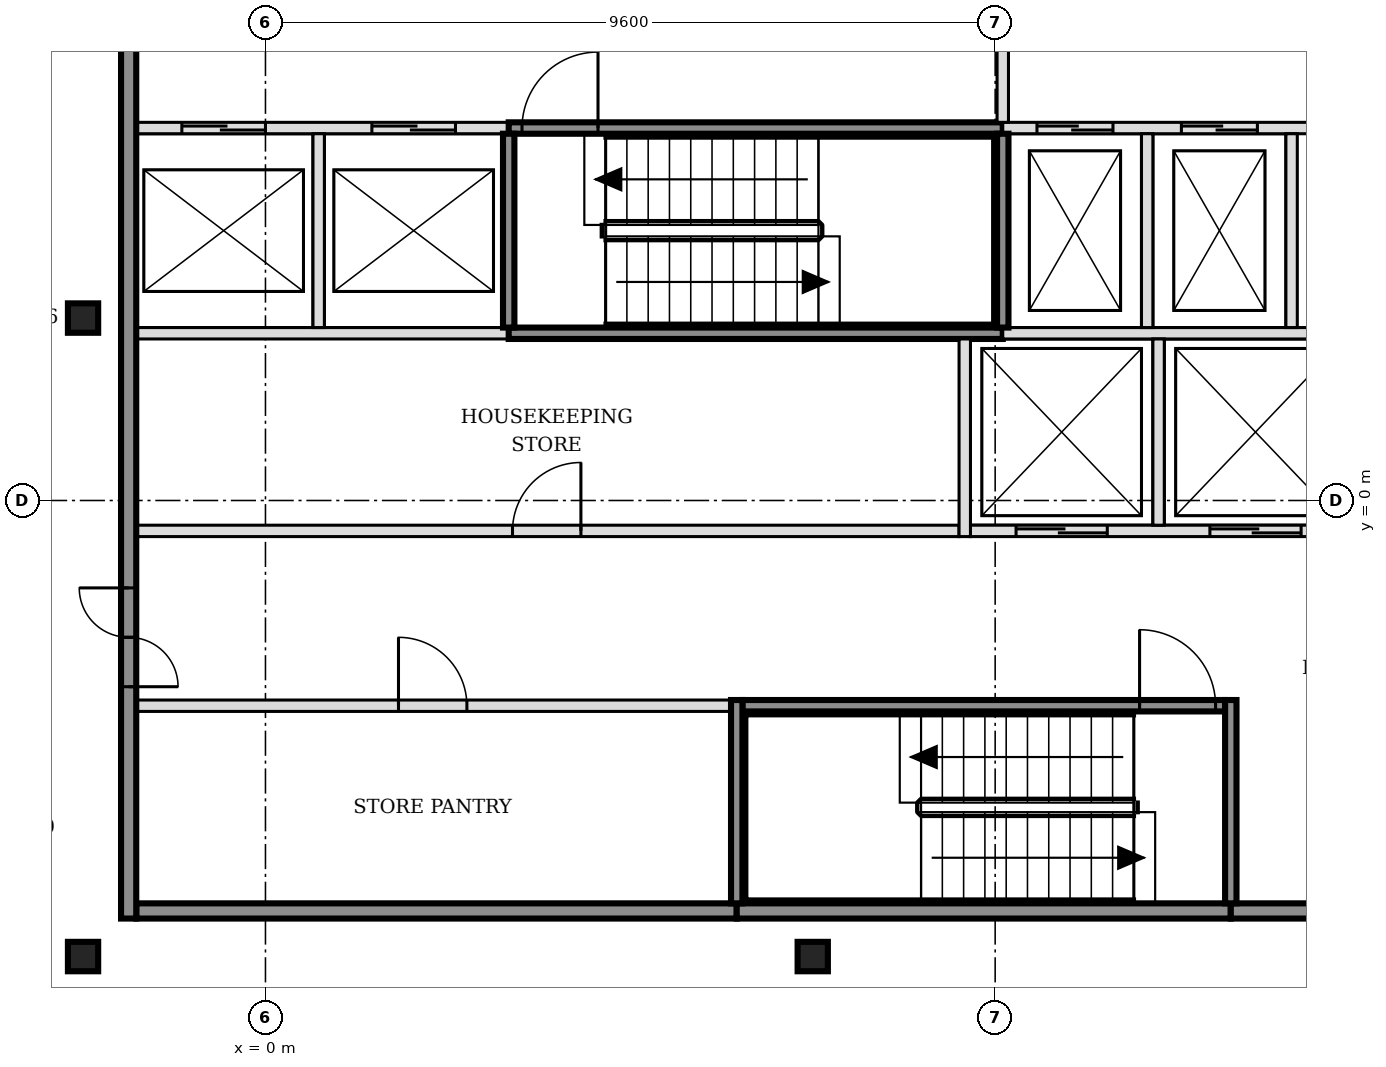
"""IFC4 building model, lengths in metres.
Left out: names, types, materials, properties, quantities, classifications, styles, units other than length and angle.
Written with IfcOpenShell. Run it as: python <this file> out.ifc"""

import sys

from ifc_helpers import new_model, si_unit, direction, frame, frame_2d, origin, origin_2d, place, context, subcontext, project, spatial, rectangle, i_section, extrude, element, fill, save


model = new_model("IFC4")
c1 = context("Model", 3, precision=1e-05, world=origin(), true_north=direction((0.0, 1.0)))
c2 = subcontext(c1, "Body", "Model", "MODEL_VIEW")
j1 = project(units=[si_unit("LENGTHUNIT", "METRE"), si_unit("PLANEANGLEUNIT", "RADIAN")], contexts=[c1])
p1 = place(None, origin())
s1 = spatial("IfcSite", under=j1, at=p1, CompositionType="ELEMENT")
p2 = place(p1, origin())
s2 = spatial("IfcBuilding", under=s1, at=p2, CompositionType="ELEMENT")
p3 = place(p2, frame((0.0, 0.0, 281.4)))
s3 = spatial("IfcBuildingStorey", under=s2, at=p3, CompositionType="ELEMENT", Elevation=281.4)
for number, where, z_axis, x_axis in (
    (1, (-2.4, -6.0, -0.15), (0.0, 0.0, 1.0), (1.0, 0.0, 0.0)),
    (2, (7.2, -6.0, -0.15), (0.0, 0.0, 1.0), (1.0, 0.0, 0.0)),
    (3, (-2.4, 2.4, -0.15), (0.0, 0.0, 1.0), (1.0, 0.0, 0.0)),
):
    element("IfcColumn", number, at=place(p3, frame(where, z_axis=z_axis, x_axis=x_axis)), inside=s3, PredefinedType="COLUMN", context=c2, shape_type="SweptSolid", body=[
        extrude(i_section(OverallWidth=0.398, OverallDepth=0.387, WebThickness=0.021, FlangeThickness=0.033, FilletRadius=0.015, at=origin_2d()), origin(), (0.0, 0.0, 1.0), 3.6),
    ])
p4 = place(p3, frame((-1.7, -5.4, 0.0), z_axis=(0.0, 0.0, 1.0), x_axis=(1.0, 0.0, 0.0)))
e4 = element("IfcWall", 4, at=p4, inside=s3, PredefinedType="SOLIDWALL", context=c2, shape_type="SweptSolid", body=[
    extrude(rectangle(XDim=7.9, YDim=0.2, at=frame_2d((3.95, 0.0))), origin(), (0.0, 0.0, 1.0), 3.45),
])
p5 = place(p3, frame((6.2, -5.4, 0.0), z_axis=(0.0, 0.0, 1.0), x_axis=(1.0, 0.0, 0.0)))
e5 = element("IfcWall", 5, at=p5, inside=s3, PredefinedType="SOLIDWALL", context=c2, shape_type="SweptSolid", body=[
    extrude(rectangle(XDim=6.5, YDim=0.2, at=frame_2d((3.25, 0.0))), origin(), (0.0, 0.0, 1.0), 3.45),
])
p6 = place(p3, frame((12.7, -5.4, 0.0), z_axis=(0.0, 0.0, 1.0), x_axis=(1.0, 0.0, 0.0)))
e6 = element("IfcWall", 6, at=p6, inside=s3, PredefinedType="SOLIDWALL", context=c2, shape_type="SweptSolid", body=[
    extrude(rectangle(XDim=3.4, YDim=0.2, at=frame_2d((1.7, 0.0))), origin(), (0.0, 0.0, 1.0), 3.45),
])
p7 = place(p3, frame((-1.7, -2.7, 0.0), z_axis=(0.0, 0.0, 1.0), x_axis=(1.0, 0.0, 0.0)))
e7 = element("IfcWall", 7, at=p7, inside=s3, PredefinedType="PARTITIONING", context=c2, shape_type="SweptSolid", body=[
    extrude(rectangle(XDim=7.825, YDim=0.15, at=frame_2d((3.913, 0.0))), origin(), (0.0, 0.0, 1.0), 3.45),
])
p8 = place(p7, frame((3.45, 0.0, 0.0)))
e8 = element("IfcOpeningElement", 8, at=p8, cuts=e7, PredefinedType="OPENING", context=c2, shape_type="SweptSolid", body=[
    extrude(rectangle(XDim=0.9, YDim=2.1, at=frame_2d((0.45, 1.05))), frame((0.0, 0.085, 0.0), z_axis=(0.0, -1.0, 0.0), x_axis=(1.0, 0.0, 0.0)), (0.0, 0.0, 1.0), 0.17),
])
p9 = place(p3, frame((6.275, -2.7, 0.0), z_axis=(0.0, 0.0, 1.0), x_axis=(1.0, 0.0, 0.0)))
e9 = element("IfcWall", 9, at=p9, inside=s3, PredefinedType="SOLIDWALL", context=c2, shape_type="SweptSolid", body=[
    extrude(rectangle(XDim=6.35, YDim=0.15, at=frame_2d((3.175, 0.0))), origin(), (0.0, 0.0, 1.0), 3.45),
])
p10 = place(p9, frame((5.225, 0.0, 0.0)))
e10 = element("IfcOpeningElement", 10, at=p10, cuts=e9, PredefinedType="OPENING", context=c2, shape_type="SweptSolid", body=[
    extrude(rectangle(XDim=1.0, YDim=2.1, at=frame_2d((0.5, 1.05))), frame((0.0, 0.085, 0.0), z_axis=(0.0, -1.0, 0.0), x_axis=(1.0, 0.0, 0.0)), (0.0, 0.0, 1.0), 0.17),
])
p11 = place(p3, frame((-1.7, -0.4, 0.0), z_axis=(0.0, 0.0, 1.0), x_axis=(1.0, 0.0, 0.0)))
e11 = element("IfcWall", 11, at=p11, inside=s3, PredefinedType="PARTITIONING", context=c2, shape_type="SweptSolid", body=[
    extrude(rectangle(XDim=10.825, YDim=0.15, at=frame_2d((5.413, 0.0))), origin(), (0.0, 0.0, 1.0), 3.45),
])
p12 = place(p11, frame((4.95, 0.0, 0.0)))
e12 = element("IfcOpeningElement", 12, at=p12, cuts=e11, PredefinedType="OPENING", context=c2, shape_type="SweptSolid", body=[
    extrude(rectangle(XDim=0.9, YDim=2.1, at=frame_2d((0.45, 1.05))), frame((0.0, 0.085, 0.0), z_axis=(0.0, -1.0, 0.0), x_axis=(1.0, 0.0, 0.0)), (0.0, 0.0, 1.0), 0.17),
])
p13 = place(p3, frame((9.275, -0.4, 0.0), z_axis=(0.0, 0.0, 1.0), x_axis=(1.0, 0.0, 0.0)))
e13 = element("IfcWall", 13, at=p13, inside=s3, PredefinedType="SOLIDWALL", context=c2, shape_type="SweptSolid", body=[
    extrude(rectangle(XDim=4.95, YDim=0.15, at=frame_2d((2.475, 0.0))), origin(), (0.0, 0.0, 1.0), 3.45),
])
p14 = place(p13, frame((0.6, 0.0, 0.0)))
e14 = element("IfcOpeningElement", 14, at=p14, cuts=e13, PredefinedType="OPENING", context=c2, shape_type="SweptSolid", body=[
    extrude(rectangle(XDim=1.2, YDim=2.1, at=frame_2d((0.6, 1.05))), frame((0.0, 0.085, 0.0), z_axis=(0.0, -1.0, 0.0), x_axis=(1.0, 0.0, 0.0)), (0.0, 0.0, 1.0), 0.17),
])
p15 = place(p13, frame((3.15, 0.0, 0.0)))
e15 = element("IfcOpeningElement", 15, at=p15, cuts=e13, PredefinedType="OPENING", context=c2, shape_type="SweptSolid", body=[
    extrude(rectangle(XDim=1.2, YDim=2.1, at=frame_2d((0.6, 1.05))), frame((0.0, 0.085, 0.0), z_axis=(0.0, -1.0, 0.0), x_axis=(1.0, 0.0, 0.0)), (0.0, 0.0, 1.0), 0.17),
])
p16 = place(p3, frame((-1.7, 2.2, 0.0), z_axis=(0.0, 0.0, 1.0), x_axis=(1.0, 0.0, 0.0)))
e16 = element("IfcWall", 16, at=p16, inside=s3, PredefinedType="SOLIDWALL", context=c2, shape_type="SweptSolid", body=[
    extrude(rectangle(XDim=4.9, YDim=0.15, at=frame_2d((2.45, 0.0))), origin(), (0.0, 0.0, 1.0), 3.45),
])
p17 = place(p3, frame((3.2, 2.2, 0.0), z_axis=(0.0, 0.0, 1.0), x_axis=(1.0, 0.0, 0.0)))
e17 = element("IfcWall", 17, at=p17, inside=s3, PredefinedType="SOLIDWALL", context=c2, shape_type="SweptSolid", body=[
    extrude(rectangle(XDim=6.5, YDim=0.15, at=frame_2d((3.25, 0.0))), origin(), (0.0, 0.0, 1.0), 3.45),
])
p18 = place(p3, frame((9.7, 2.2, 0.0), z_axis=(0.0, 0.0, 1.0), x_axis=(1.0, 0.0, 0.0)))
e18 = element("IfcWall", 18, at=p18, inside=s3, PredefinedType="SOLIDWALL", context=c2, shape_type="SweptSolid", body=[
    extrude(rectangle(XDim=4.525, YDim=0.15, at=frame_2d((2.263, 0.0))), origin(), (0.0, 0.0, 1.0), 3.45),
])
p19 = place(p3, frame((-1.7, 4.9, 0.0), z_axis=(0.0, 0.0, 1.0), x_axis=(1.0, 0.0, 0.0)))
e19 = element("IfcWall", 19, at=p19, inside=s3, PredefinedType="SOLIDWALL", context=c2, shape_type="SweptSolid", body=[
    extrude(rectangle(XDim=4.9, YDim=0.15, at=frame_2d((2.45, 0.0))), origin(), (0.0, 0.0, 1.0), 3.45),
])
p20 = place(p19, frame((0.6, 0.0, 0.0)))
e20 = element("IfcOpeningElement", 20, at=p20, cuts=e19, PredefinedType="OPENING", context=c2, shape_type="SweptSolid", body=[
    extrude(rectangle(XDim=1.1, YDim=2.1, at=frame_2d((0.55, 1.05))), frame((0.0, 0.085, 0.0), z_axis=(0.0, -1.0, 0.0), x_axis=(1.0, 0.0, 0.0)), (0.0, 0.0, 1.0), 0.17),
])
p21 = place(p19, frame((3.1, 0.0, 0.0)))
e21 = element("IfcOpeningElement", 21, at=p21, cuts=e19, PredefinedType="OPENING", context=c2, shape_type="SweptSolid", body=[
    extrude(rectangle(XDim=1.1, YDim=2.1, at=frame_2d((0.55, 1.05))), frame((0.0, 0.085, 0.0), z_axis=(0.0, -1.0, 0.0), x_axis=(1.0, 0.0, 0.0)), (0.0, 0.0, 1.0), 0.17),
])
p22 = place(p3, frame((3.2, 4.9, 0.0), z_axis=(0.0, 0.0, 1.0), x_axis=(1.0, 0.0, 0.0)))
e22 = element("IfcWall", 22, at=p22, inside=s3, PredefinedType="SOLIDWALL", context=c2, shape_type="SweptSolid", body=[
    extrude(rectangle(XDim=6.5, YDim=0.15, at=frame_2d((3.25, 0.0))), origin(), (0.0, 0.0, 1.0), 3.45),
])
p23 = place(p22, frame((0.175, 0.0, 0.0)))
e23 = element("IfcOpeningElement", 23, at=p23, cuts=e22, PredefinedType="OPENING", context=c2, shape_type="SweptSolid", body=[
    extrude(rectangle(XDim=1.0, YDim=2.1, at=frame_2d((0.5, 1.05))), frame((0.0, 0.085, 0.0), z_axis=(0.0, -1.0, 0.0), x_axis=(1.0, 0.0, 0.0)), (0.0, 0.0, 1.0), 0.17),
])
p24 = place(p3, frame((9.7, 4.9, 0.0), z_axis=(0.0, 0.0, 1.0), x_axis=(1.0, 0.0, 0.0)))
e24 = element("IfcWall", 24, at=p24, inside=s3, PredefinedType="SOLIDWALL", context=c2, shape_type="SweptSolid", body=[
    extrude(rectangle(XDim=6.4, YDim=0.15, at=frame_2d((3.2, 0.0))), origin(), (0.0, 0.0, 1.0), 3.45),
])
p25 = place(p24, frame((0.45, 0.0, 0.0)))
e25 = element("IfcOpeningElement", 25, at=p25, cuts=e24, PredefinedType="OPENING", context=c2, shape_type="SweptSolid", body=[
    extrude(rectangle(XDim=1.0, YDim=2.1, at=frame_2d((0.5, 1.05))), frame((0.0, 0.085, 0.0), z_axis=(0.0, -1.0, 0.0), x_axis=(1.0, 0.0, 0.0)), (0.0, 0.0, 1.0), 0.17),
])
p26 = place(p24, frame((2.35, 0.0, 0.0)))
e26 = element("IfcOpeningElement", 26, at=p26, cuts=e24, PredefinedType="OPENING", context=c2, shape_type="SweptSolid", body=[
    extrude(rectangle(XDim=1.0, YDim=2.1, at=frame_2d((0.5, 1.05))), frame((0.0, 0.085, 0.0), z_axis=(0.0, -1.0, 0.0), x_axis=(1.0, 0.0, 0.0)), (0.0, 0.0, 1.0), 0.17),
])
p27 = place(p24, frame((4.7, 0.0, 0.0)))
e27 = element("IfcOpeningElement", 27, at=p27, cuts=e24, PredefinedType="OPENING", context=c2, shape_type="SweptSolid", body=[
    extrude(rectangle(XDim=0.9, YDim=2.1, at=frame_2d((0.45, 1.05))), frame((0.0, 0.085, 0.0), z_axis=(0.0, -1.0, 0.0), x_axis=(1.0, 0.0, 0.0)), (0.0, 0.0, 1.0), 0.17),
])
p28 = place(p3, frame((-1.8, -5.5, 0.0), z_axis=(0.0, 0.0, 1.0), x_axis=(0.0, 1.0, 0.0)))
e28 = element("IfcWall", 28, at=p28, inside=s3, PredefinedType="SOLIDWALL", context=c2, shape_type="SweptSolid", body=[
    extrude(rectangle(XDim=15.8, YDim=0.2, at=frame_2d((7.9, 0.0))), origin(), (0.0, 0.0, 1.0), 3.45),
])
p29 = place(p28, frame((3.05, 0.0, 0.0)))
e29 = element("IfcOpeningElement", 29, at=p29, cuts=e28, PredefinedType="OPENING", context=c2, shape_type="SweptSolid", body=[
    extrude(rectangle(XDim=1.3, YDim=2.1, at=frame_2d((0.65, 1.05))), frame((0.0, 0.11, 0.0), z_axis=(0.0, -1.0, 0.0), x_axis=(1.0, 0.0, 0.0)), (0.0, 0.0, 1.0), 0.22),
])
p30 = place(p28, frame((11.45, 0.0, 0.0)))
e30 = element("IfcOpeningElement", 30, at=p30, cuts=e28, PredefinedType="OPENING", context=c2, shape_type="SweptSolid", body=[
    extrude(rectangle(XDim=1.3, YDim=2.1, at=frame_2d((0.65, 1.05))), frame((0.0, 0.11, 0.0), z_axis=(0.0, -1.0, 0.0), x_axis=(1.0, 0.0, 0.0)), (0.0, 0.0, 1.0), 0.22),
])
for number, where, z_axis, x_axis in (
    (31, (0.7, 2.275, 0.0), (0.0, 0.0, 1.0), (0.0, 1.0, 0.0)),
    (32, (3.2, 2.275, 0.0), (0.0, 0.0, 1.0), (0.0, 1.0, 0.0)),
):
    element("IfcWall", number, at=place(p3, frame(where, z_axis=z_axis, x_axis=x_axis)), inside=s3, PredefinedType="SOLIDWALL", context=c2, shape_type="SweptSolid", body=[
        extrude(rectangle(XDim=2.55, YDim=0.15, at=frame_2d((1.275, 0.0))), origin(), (0.0, 0.0, 1.0), 3.45),
    ])
p31 = place(p3, frame((6.2, -5.3, 0.0), z_axis=(0.0, 0.0, 1.0), x_axis=(0.0, 1.0, 0.0)))
e33 = element("IfcWall", 33, at=p31, inside=s3, PredefinedType="SOLIDWALL", context=c2, shape_type="SweptSolid", body=[
    extrude(rectangle(XDim=2.675, YDim=0.15, at=frame_2d((1.337, 0.0))), origin(), (0.0, 0.0, 1.0), 3.45),
])
p32 = place(p3, frame((9.2, -0.475, 0.0), z_axis=(0.0, 0.0, 1.0), x_axis=(0.0, 1.0, 0.0)))
e34 = element("IfcWall", 34, at=p32, inside=s3, PredefinedType="SOLIDWALL", context=c2, shape_type="SweptSolid", body=[
    extrude(rectangle(XDim=2.6, YDim=0.15, at=frame_2d((1.3, 0.0))), origin(), (0.0, 0.0, 1.0), 3.45),
])
p33 = place(p3, frame((9.7, 2.275, 0.0), z_axis=(0.0, 0.0, 1.0), x_axis=(0.0, 1.0, 0.0)))
e35 = element("IfcWall", 35, at=p33, inside=s3, PredefinedType="SOLIDWALL", context=c2, shape_type="SweptSolid", body=[
    extrude(rectangle(XDim=2.55, YDim=0.15, at=frame_2d((1.275, 0.0))), origin(), (0.0, 0.0, 1.0), 3.45),
])
p34 = place(p3, frame((9.7, 4.975, 0.0), z_axis=(0.0, 0.0, 1.0), x_axis=(0.0, 1.0, 0.0)))
e36 = element("IfcWall", 36, at=p34, inside=s3, PredefinedType="SOLIDWALL", context=c2, shape_type="SweptSolid", body=[
    extrude(rectangle(XDim=2.45, YDim=0.15, at=frame_2d((1.225, 0.0))), origin(), (0.0, 0.0, 1.0), 3.45),
])
p35 = place(p3, frame((11.6, 2.275, 0.0), z_axis=(0.0, 0.0, 1.0), x_axis=(0.0, 1.0, 0.0)))
e37 = element("IfcWall", 37, at=p35, inside=s3, PredefinedType="SOLIDWALL", context=c2, shape_type="SweptSolid", body=[
    extrude(rectangle(XDim=2.55, YDim=0.15, at=frame_2d((1.275, 0.0))), origin(), (0.0, 0.0, 1.0), 3.45),
])
p36 = place(p3, frame((11.75, -0.325, 0.0), z_axis=(0.0, 0.0, 1.0), x_axis=(0.0, 1.0, 0.0)))
e38 = element("IfcWall", 38, at=p36, inside=s3, PredefinedType="SOLIDWALL", context=c2, shape_type="SweptSolid", body=[
    extrude(rectangle(XDim=2.45, YDim=0.15, at=frame_2d((1.225, 0.0))), origin(), (0.0, 0.0, 1.0), 3.45),
])
p37 = place(p3, frame((12.7, -5.3, 0.0), z_axis=(0.0, 0.0, 1.0), x_axis=(0.0, 1.0, 0.0)))
e39 = element("IfcWall", 39, at=p37, inside=s3, PredefinedType="SOLIDWALL", context=c2, shape_type="SweptSolid", body=[
    extrude(rectangle(XDim=2.675, YDim=0.15, at=frame_2d((1.337, 0.0))), origin(), (0.0, 0.0, 1.0), 3.45),
])
p38 = place(p3, frame((13.5, 2.275, 0.0), z_axis=(0.0, 0.0, 1.0), x_axis=(0.0, 1.0, 0.0)))
e40 = element("IfcWall", 40, at=p38, inside=s3, PredefinedType="SOLIDWALL", context=c2, shape_type="SweptSolid", body=[
    extrude(rectangle(XDim=2.55, YDim=0.15, at=frame_2d((1.275, 0.0))), origin(), (0.0, 0.0, 1.0), 3.45),
])
p39 = place(p14, origin())
e41 = element("IfcDoor", 41, at=p39, inside=s3, OperationType="DOUBLE_DOOR_SLIDING", PredefinedType="DOOR", context=c2, shape_type="SweptSolid", body=[
    extrude(rectangle(XDim=1.2, YDim=2.1, at=frame_2d((0.6, 1.05))), frame((0.0, 0.025, 0.0), z_axis=(0.0, -1.0, 0.0), x_axis=(1.0, 0.0, 0.0)), (0.0, 0.0, 1.0), 0.05),
])
fill(e14, e41)
p40 = place(p15, origin())
e42 = element("IfcDoor", 42, at=p40, inside=s3, OperationType="DOUBLE_DOOR_SLIDING", PredefinedType="DOOR", context=c2, shape_type="SweptSolid", body=[
    extrude(rectangle(XDim=1.2, YDim=2.1, at=frame_2d((0.6, 1.05))), frame((0.0, 0.025, 0.0), z_axis=(0.0, -1.0, 0.0), x_axis=(1.0, 0.0, 0.0)), (0.0, 0.0, 1.0), 0.05),
])
fill(e15, e42)
p41 = place(p20, origin())
e43 = element("IfcDoor", 43, at=p41, inside=s3, OperationType="DOUBLE_DOOR_SLIDING", PredefinedType="DOOR", context=c2, shape_type="SweptSolid", body=[
    extrude(rectangle(XDim=1.1, YDim=2.1, at=frame_2d((0.55, 1.05))), frame((0.0, 0.025, 0.0), z_axis=(0.0, -1.0, 0.0), x_axis=(1.0, 0.0, 0.0)), (0.0, 0.0, 1.0), 0.05),
])
fill(e20, e43)
p42 = place(p21, origin())
e44 = element("IfcDoor", 44, at=p42, inside=s3, OperationType="DOUBLE_DOOR_SLIDING", PredefinedType="DOOR", context=c2, shape_type="SweptSolid", body=[
    extrude(rectangle(XDim=1.1, YDim=2.1, at=frame_2d((0.55, 1.05))), frame((0.0, 0.025, 0.0), z_axis=(0.0, -1.0, 0.0), x_axis=(1.0, 0.0, 0.0)), (0.0, 0.0, 1.0), 0.05),
])
fill(e21, e44)
p43 = place(p25, origin())
e45 = element("IfcDoor", 45, at=p43, inside=s3, OperationType="DOUBLE_DOOR_SLIDING", PredefinedType="DOOR", context=c2, shape_type="SweptSolid", body=[
    extrude(rectangle(XDim=1.0, YDim=2.1, at=frame_2d((0.5, 1.05))), frame((0.0, 0.025, 0.0), z_axis=(0.0, -1.0, 0.0), x_axis=(1.0, 0.0, 0.0)), (0.0, 0.0, 1.0), 0.05),
])
fill(e25, e45)
p44 = place(p26, origin())
e46 = element("IfcDoor", 46, at=p44, inside=s3, OperationType="DOUBLE_DOOR_SLIDING", PredefinedType="DOOR", context=c2, shape_type="SweptSolid", body=[
    extrude(rectangle(XDim=1.0, YDim=2.1, at=frame_2d((0.5, 1.05))), frame((0.0, 0.025, 0.0), z_axis=(0.0, -1.0, 0.0), x_axis=(1.0, 0.0, 0.0)), (0.0, 0.0, 1.0), 0.05),
])
fill(e26, e46)
p45 = place(p10, origin())
e47 = element("IfcDoor", 47, at=p45, inside=s3, OperationType="SINGLE_SWING_LEFT", PredefinedType="DOOR", context=c2, shape_type="SweptSolid", body=[
    extrude(rectangle(XDim=1.0, YDim=2.1, at=frame_2d((0.5, 1.05))), frame((0.0, 0.025, 0.0), z_axis=(0.0, -1.0, 0.0), x_axis=(1.0, 0.0, 0.0)), (0.0, 0.0, 1.0), 0.05),
])
fill(e10, e47)
p46 = place(p23, origin())
e48 = element("IfcDoor", 48, at=p46, inside=s3, OperationType="SINGLE_SWING_RIGHT", PredefinedType="DOOR", context=c2, shape_type="SweptSolid", body=[
    extrude(rectangle(XDim=1.0, YDim=2.1, at=frame_2d((0.5, 1.05))), frame((0.0, 0.025, 0.0), z_axis=(0.0, -1.0, 0.0), x_axis=(1.0, 0.0, 0.0)), (0.0, 0.0, 1.0), 0.05),
])
fill(e23, e48)
p47 = place(p29, origin())
e49 = element("IfcDoor", 49, at=p47, inside=s3, OperationType="DOUBLE_DOOR_SINGLE_SWING", PredefinedType="DOOR", context=c2, shape_type="SweptSolid", body=[
    extrude(rectangle(XDim=1.3, YDim=2.1, at=frame_2d((0.65, 1.05))), frame((0.0, 0.025, 0.0), z_axis=(0.0, -1.0, 0.0), x_axis=(1.0, 0.0, 0.0)), (0.0, 0.0, 1.0), 0.05),
])
fill(e29, e49)
p48 = place(p8, origin())
e50 = element("IfcDoor", 50, at=p48, inside=s3, OperationType="SINGLE_SWING_LEFT", PredefinedType="DOOR", context=c2, shape_type="SweptSolid", body=[
    extrude(rectangle(XDim=0.9, YDim=2.1, at=frame_2d((0.45, 1.05))), frame((0.0, 0.025, 0.0), z_axis=(0.0, -1.0, 0.0), x_axis=(1.0, 0.0, 0.0)), (0.0, 0.0, 1.0), 0.05),
])
fill(e8, e50)
p49 = place(p12, origin())
e51 = element("IfcDoor", 51, at=p49, inside=s3, OperationType="SINGLE_SWING_RIGHT", PredefinedType="DOOR", context=c2, shape_type="SweptSolid", body=[
    extrude(rectangle(XDim=0.9, YDim=2.1, at=frame_2d((0.45, 1.05))), frame((0.0, 0.025, 0.0), z_axis=(0.0, -1.0, 0.0), x_axis=(1.0, 0.0, 0.0)), (0.0, 0.0, 1.0), 0.05),
])
fill(e12, e51)
save(model, sys.argv[1])
